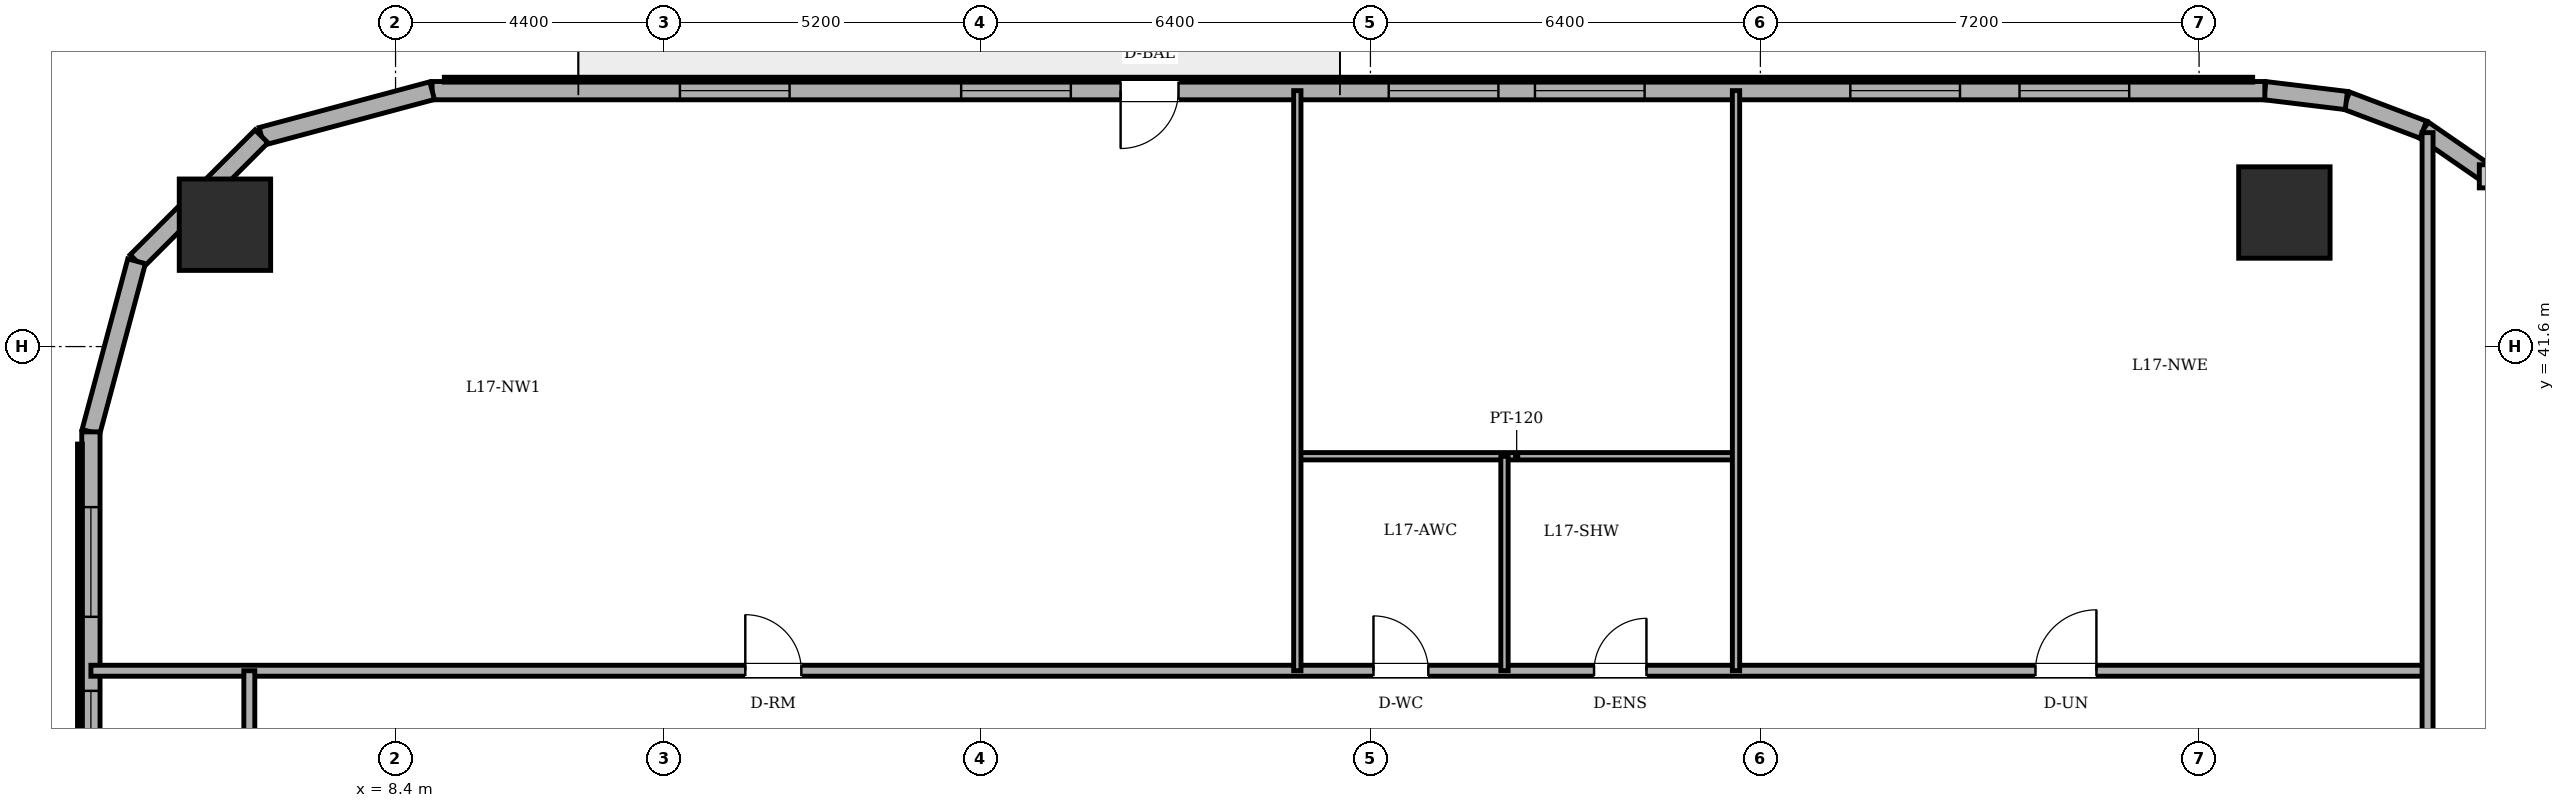
"""IFC4 building model, lengths in metres.
Left out: names, types, materials, properties, quantities, classifications, styles, units other than length and angle.
Written with IfcOpenShell. Run it as: python <this file> out.ifc"""

import sys

from ifc_helpers import new_model, si_unit, direction, frame, frame_2d, origin, origin_2d, place, context, subcontext, project, spatial, rectangle, circle, extrude, element, fill, save


model = new_model("IFC4")
c1 = context("Model", 3, precision=1e-05, world=origin(), true_north=direction((0.0, 1.0)))
c2 = subcontext(c1, "Body", "Model", "MODEL_VIEW")
j1 = project(units=[si_unit("LENGTHUNIT", "METRE"), si_unit("PLANEANGLEUNIT", "RADIAN")], contexts=[c1])
p1 = place(None, origin())
s1 = spatial("IfcSite", under=j1, at=p1, CompositionType="ELEMENT")
p2 = place(p1, origin())
s2 = spatial("IfcBuilding", under=s1, at=p2, CompositionType="ELEMENT")
p3 = place(p2, frame((0.0, 0.0, 64.8)))
s3 = spatial("IfcBuildingStorey", under=s2, at=p3, CompositionType="ELEMENT", Elevation=64.8)
for number, where, z_axis, x_axis in (
    (1, (39.4, 43.8, 0.0), (0.0, 0.0, 1.0), (1.0, 0.0, 0.0)),
    (2, (5.6, 43.6, 0.0), (0.0, 0.0, 1.0), (1.0, 0.0, 0.0)),
):
    element("IfcColumn", number, at=place(p3, frame(where, z_axis=z_axis, x_axis=x_axis)), inside=s3, PredefinedType="COLUMN", context=c2, shape_type="SweptSolid", body=[
        extrude(circle(Radius=0.75, at=origin_2d()), origin(), (0.0, 0.0, 1.0), 3.6),
    ])
p4 = place(p3, frame((42.789, 44.394, 0.0), z_axis=(0.0, 0.0, 1.0), x_axis=(-0.823116500192, 0.567872544777, 0.0)))
e3 = element("IfcWall", 3, at=p4, inside=s3, PredefinedType="SOLIDWALL", context=c2, shape_type="SweptSolid", body=[
    extrude(rectangle(XDim=1.349, YDim=0.3, at=frame_2d((0.674, 0.0))), origin(), (0.0, 0.0, 1.0), 3.4),
])
p5 = place(p3, frame((41.679, 45.16, 0.0), z_axis=(0.0, 0.0, 1.0), x_axis=(-0.935156721165, 0.354234254216, 0.0)))
e4 = element("IfcWall", 4, at=p5, inside=s3, PredefinedType="SOLIDWALL", context=c2, shape_type="SweptSolid", body=[
    extrude(rectangle(XDim=1.349, YDim=0.3, at=frame_2d((0.675, 0.0))), origin(), (0.0, 0.0, 1.0), 3.4),
])
p6 = place(p3, frame((40.417, 45.638, 0.0), z_axis=(0.0, 0.0, 1.0), x_axis=(-0.992739027259, 0.120288086515, 0.0)))
e5 = element("IfcWall", 5, at=p6, inside=s3, PredefinedType="SOLIDWALL", context=c2, shape_type="SweptSolid", body=[
    extrude(rectangle(XDim=1.348, YDim=0.3, at=frame_2d((0.674, 0.0))), origin(), (0.0, 0.0, 1.0), 3.4),
])
p7 = place(p3, frame((39.079, 45.8, 0.0), z_axis=(0.0, 0.0, 1.0), x_axis=(-1.0, 0.0, 0.0)))
e6 = element("IfcWall", 6, at=p7, inside=s3, PredefinedType="SOLIDWALL", context=c2, shape_type="SweptSolid", body=[
    extrude(rectangle(XDim=30.079, YDim=0.3, at=frame_2d((15.04, 0.0))), origin(), (0.0, 0.0, 1.0), 3.4),
])
p8 = place(p7, frame((17.829, 0.0, 0.0)))
e7 = element("IfcOpeningElement", 7, at=p8, cuts=e6, PredefinedType="OPENING", context=c2, shape_type="SweptSolid", body=[
    extrude(rectangle(XDim=0.95, YDim=2.2, at=frame_2d((0.475, 1.1))), frame((0.0, 0.16, 0.0), z_axis=(0.0, -1.0, 0.0), x_axis=(1.0, 0.0, 0.0)), (0.0, 0.0, 1.0), 0.32),
])
p9 = place(p7, frame((2.226, 0.0, 0.85)))
e8 = element("IfcOpeningElement", 8, at=p9, cuts=e6, PredefinedType="OPENING", context=c2, shape_type="SweptSolid", body=[
    extrude(rectangle(XDim=1.8, YDim=1.55, at=frame_2d((0.9, 0.775))), frame((0.0, 0.16, 0.0), z_axis=(0.0, -1.0, 0.0), x_axis=(1.0, 0.0, 0.0)), (0.0, 0.0, 1.0), 0.32),
])
p10 = place(p7, frame((5.003, 0.0, 0.85)))
e9 = element("IfcOpeningElement", 9, at=p10, cuts=e6, PredefinedType="OPENING", context=c2, shape_type="SweptSolid", body=[
    extrude(rectangle(XDim=1.8, YDim=1.55, at=frame_2d((0.9, 0.775))), frame((0.0, 0.16, 0.0), z_axis=(0.0, -1.0, 0.0), x_axis=(1.0, 0.0, 0.0)), (0.0, 0.0, 1.0), 0.32),
])
p11 = place(p7, frame((10.179, 0.0, 0.85)))
e10 = element("IfcOpeningElement", 10, at=p11, cuts=e6, PredefinedType="OPENING", context=c2, shape_type="SweptSolid", body=[
    extrude(rectangle(XDim=1.8, YDim=1.55, at=frame_2d((0.9, 0.775))), frame((0.0, 0.16, 0.0), z_axis=(0.0, -1.0, 0.0), x_axis=(1.0, 0.0, 0.0)), (0.0, 0.0, 1.0), 0.32),
])
p12 = place(p7, frame((12.579, 0.0, 0.85)))
e11 = element("IfcOpeningElement", 11, at=p12, cuts=e6, PredefinedType="OPENING", context=c2, shape_type="SweptSolid", body=[
    extrude(rectangle(XDim=1.8, YDim=1.55, at=frame_2d((0.9, 0.775))), frame((0.0, 0.16, 0.0), z_axis=(0.0, -1.0, 0.0), x_axis=(1.0, 0.0, 0.0)), (0.0, 0.0, 1.0), 0.32),
])
p13 = place(p7, frame((19.596, 0.0, 0.85)))
e12 = element("IfcOpeningElement", 12, at=p13, cuts=e6, PredefinedType="OPENING", context=c2, shape_type="SweptSolid", body=[
    extrude(rectangle(XDim=1.8, YDim=1.55, at=frame_2d((0.9, 0.775))), frame((0.0, 0.16, 0.0), z_axis=(0.0, -1.0, 0.0), x_axis=(1.0, 0.0, 0.0)), (0.0, 0.0, 1.0), 0.32),
])
p14 = place(p7, frame((24.212, 0.0, 0.85)))
e13 = element("IfcOpeningElement", 13, at=p14, cuts=e6, PredefinedType="OPENING", context=c2, shape_type="SweptSolid", body=[
    extrude(rectangle(XDim=1.8, YDim=1.55, at=frame_2d((0.9, 0.775))), frame((0.0, 0.16, 0.0), z_axis=(0.0, -1.0, 0.0), x_axis=(1.0, 0.0, 0.0)), (0.0, 0.0, 1.0), 0.32),
])
p15 = place(p3, frame((9.0, 45.8, 0.0), z_axis=(0.0, 0.0, 1.0), x_axis=(-0.96594917914, -0.258731875344, 0.0)))
e14 = element("IfcWall", 14, at=p15, inside=s3, PredefinedType="SOLIDWALL", context=c2, shape_type="SweptSolid", body=[
    extrude(rectangle(XDim=2.899, YDim=0.3, at=frame_2d((1.449, 0.0))), origin(), (0.0, 0.0, 1.0), 3.4),
])
p16 = place(p3, frame((6.2, 45.05, 0.0), z_axis=(0.0, 0.0, 1.0), x_axis=(-0.707106781187, -0.707106781187, 0.0)))
e15 = element("IfcWall", 15, at=p16, inside=s3, PredefinedType="SOLIDWALL", context=c2, shape_type="SweptSolid", body=[
    extrude(rectangle(XDim=2.899, YDim=0.3, at=frame_2d((1.45, 0.0))), origin(), (0.0, 0.0, 1.0), 3.4),
])
p17 = place(p3, frame((4.15, 43.0, 0.0), z_axis=(0.0, 0.0, 1.0), x_axis=(-0.258731875344, -0.96594917914, 0.0)))
e16 = element("IfcWall", 16, at=p17, inside=s3, PredefinedType="SOLIDWALL", context=c2, shape_type="SweptSolid", body=[
    extrude(rectangle(XDim=2.899, YDim=0.3, at=frame_2d((1.449, 0.0))), origin(), (0.0, 0.0, 1.0), 3.4),
])
p18 = place(p3, frame((3.4, 40.2, 0.0), z_axis=(0.0, 0.0, 1.0), x_axis=(0.0, -1.0, 0.0)))
e17 = element("IfcWall", 17, at=p18, inside=s3, PredefinedType="SOLIDWALL", context=c2, shape_type="SweptSolid", body=[
    extrude(rectangle(XDim=32.4, YDim=0.3, at=frame_2d((16.2, 0.0))), origin(), (0.0, 0.0, 1.0), 3.4),
])
p19 = place(p18, frame((1.235, 0.0, 0.85)))
e18 = element("IfcOpeningElement", 18, at=p19, cuts=e17, PredefinedType="OPENING", context=c2, shape_type="SweptSolid", body=[
    extrude(rectangle(XDim=1.8, YDim=1.55, at=frame_2d((0.9, 0.775))), frame((0.0, 0.16, 0.0), z_axis=(0.0, -1.0, 0.0), x_axis=(1.0, 0.0, 0.0)), (0.0, 0.0, 1.0), 0.32),
])
p20 = place(p18, frame((4.25, 0.0, 0.85)))
e19 = element("IfcOpeningElement", 19, at=p20, cuts=e17, PredefinedType="OPENING", context=c2, shape_type="SweptSolid", body=[
    extrude(rectangle(XDim=1.8, YDim=1.55, at=frame_2d((0.9, 0.775))), frame((0.0, 0.16, 0.0), z_axis=(0.0, -1.0, 0.0), x_axis=(1.0, 0.0, 0.0)), (0.0, 0.0, 1.0), 0.32),
])
p21 = place(p18, frame((12.027, 0.0, 0.85)))
e20 = element("IfcOpeningElement", 20, at=p21, cuts=e17, PredefinedType="OPENING", context=c2, shape_type="SweptSolid", body=[
    extrude(rectangle(XDim=1.8, YDim=1.55, at=frame_2d((0.9, 0.775))), frame((0.0, 0.16, 0.0), z_axis=(0.0, -1.0, 0.0), x_axis=(1.0, 0.0, 0.0)), (0.0, 0.0, 1.0), 0.32),
])
p22 = place(p18, frame((18.573, 0.0, 0.85)))
e21 = element("IfcOpeningElement", 21, at=p22, cuts=e17, PredefinedType="OPENING", context=c2, shape_type="SweptSolid", body=[
    extrude(rectangle(XDim=1.8, YDim=1.55, at=frame_2d((0.9, 0.775))), frame((0.0, 0.16, 0.0), z_axis=(0.0, -1.0, 0.0), x_axis=(1.0, 0.0, 0.0)), (0.0, 0.0, 1.0), 0.32),
])
p23 = place(p18, frame((26.35, 0.0, 0.85)))
e22 = element("IfcOpeningElement", 22, at=p23, cuts=e17, PredefinedType="OPENING", context=c2, shape_type="SweptSolid", body=[
    extrude(rectangle(XDim=1.8, YDim=1.55, at=frame_2d((0.9, 0.775))), frame((0.0, 0.16, 0.0), z_axis=(0.0, -1.0, 0.0), x_axis=(1.0, 0.0, 0.0)), (0.0, 0.0, 1.0), 0.32),
])
p24 = place(p18, frame((29.365, 0.0, 0.85)))
e23 = element("IfcOpeningElement", 23, at=p24, cuts=e17, PredefinedType="OPENING", context=c2, shape_type="SweptSolid", body=[
    extrude(rectangle(XDim=1.8, YDim=1.55, at=frame_2d((0.9, 0.775))), frame((0.0, 0.16, 0.0), z_axis=(0.0, -1.0, 0.0), x_axis=(1.0, 0.0, 0.0)), (0.0, 0.0, 1.0), 0.32),
])
p25 = place(p3, frame((3.4, 36.28, 0.0), z_axis=(0.0, 0.0, 1.0), x_axis=(1.0, 0.0, 0.0)))
e24 = element("IfcWall", 24, at=p25, inside=s3, PredefinedType="PARTITIONING", context=c2, shape_type="SweptSolid", body=[
    extrude(rectangle(XDim=38.35, YDim=0.18, at=frame_2d((19.175, 0.0))), origin(), (0.0, 0.0, 1.0), 3.4),
])
p26 = place(p25, frame((21.05, 0.0, 0.0)))
e25 = element("IfcOpeningElement", 25, at=p26, cuts=e24, PredefinedType="OPENING", context=c2, shape_type="SweptSolid", body=[
    extrude(rectangle(XDim=0.9, YDim=2.1, at=frame_2d((0.45, 1.05))), frame((0.0, 0.1, 0.0), z_axis=(0.0, -1.0, 0.0), x_axis=(1.0, 0.0, 0.0)), (0.0, 0.0, 1.0), 0.2),
])
p27 = place(p25, frame((24.67, 0.0, 0.0)))
e26 = element("IfcOpeningElement", 26, at=p27, cuts=e24, PredefinedType="OPENING", context=c2, shape_type="SweptSolid", body=[
    extrude(rectangle(XDim=0.86, YDim=2.1, at=frame_2d((0.43, 1.05))), frame((0.0, 0.1, 0.0), z_axis=(0.0, -1.0, 0.0), x_axis=(1.0, 0.0, 0.0)), (0.0, 0.0, 1.0), 0.2),
])
p28 = place(p25, frame((10.74, 0.0, 0.0)))
e27 = element("IfcOpeningElement", 27, at=p28, cuts=e24, PredefinedType="OPENING", context=c2, shape_type="SweptSolid", body=[
    extrude(rectangle(XDim=0.92, YDim=2.1, at=frame_2d((0.46, 1.05))), frame((0.0, 0.1, 0.0), z_axis=(0.0, -1.0, 0.0), x_axis=(1.0, 0.0, 0.0)), (0.0, 0.0, 1.0), 0.2),
])
p29 = place(p25, frame((31.915, 0.0, 0.0)))
e28 = element("IfcOpeningElement", 28, at=p29, cuts=e24, PredefinedType="OPENING", context=c2, shape_type="SweptSolid", body=[
    extrude(rectangle(XDim=1.0, YDim=2.15, at=frame_2d((0.5, 1.075))), frame((0.0, 0.1, 0.0), z_axis=(0.0, -1.0, 0.0), x_axis=(1.0, 0.0, 0.0)), (0.0, 0.0, 1.0), 0.2),
])
p30 = place(p3, frame((23.2, 39.8, 0.0), z_axis=(0.0, 0.0, 1.0), x_axis=(1.0, 0.0, 0.0)))
e29 = element("IfcWall", 29, at=p30, inside=s3, PredefinedType="PARTITIONING", context=c2, shape_type="SweptSolid", body=[
    extrude(rectangle(XDim=7.2, YDim=0.12, at=frame_2d((3.6, 0.0))), origin(), (0.0, 0.0, 1.0), 3.4),
])
p31 = place(p3, frame((6.0, 33.82, 0.0), z_axis=(0.0, 0.0, 1.0), x_axis=(0.0, 1.0, 0.0)))
e30 = element("IfcWall", 30, at=p31, inside=s3, PredefinedType="PARTITIONING", context=c2, shape_type="SweptSolid", body=[
    extrude(rectangle(XDim=2.46, YDim=0.18, at=frame_2d((1.23, 0.0))), origin(), (0.0, 0.0, 1.0), 3.4),
])
p32 = place(p3, frame((23.2, 36.28, 0.0), z_axis=(0.0, 0.0, 1.0), x_axis=(0.0, 1.0, 0.0)))
e31 = element("IfcWall", 31, at=p32, inside=s3, PredefinedType="PARTITIONING", context=c2, shape_type="SweptSolid", body=[
    extrude(rectangle(XDim=9.52, YDim=0.12, at=frame_2d((4.76, 0.0))), origin(), (0.0, 0.0, 1.0), 3.4),
])
p33 = place(p3, frame((26.6, 36.28, 0.0), z_axis=(0.0, 0.0, 1.0), x_axis=(0.0, 1.0, 0.0)))
e32 = element("IfcWall", 32, at=p33, inside=s3, PredefinedType="PARTITIONING", context=c2, shape_type="SweptSolid", body=[
    extrude(rectangle(XDim=3.52, YDim=0.12, at=frame_2d((1.76, 0.0))), origin(), (0.0, 0.0, 1.0), 3.4),
])
p34 = place(p3, frame((30.4, 36.28, 0.0), z_axis=(0.0, 0.0, 1.0), x_axis=(0.0, 1.0, 0.0)))
e33 = element("IfcWall", 33, at=p34, inside=s3, PredefinedType="PARTITIONING", context=c2, shape_type="SweptSolid", body=[
    extrude(rectangle(XDim=9.52, YDim=0.12, at=frame_2d((4.76, 0.0))), origin(), (0.0, 0.0, 1.0), 3.4),
])
p35 = place(p3, frame((41.75, 25.18, 0.0), z_axis=(0.0, 0.0, 1.0), x_axis=(0.0, 1.0, 0.0)))
e34 = element("IfcWall", 34, at=p35, inside=s3, PredefinedType="PARTITIONING", context=c2, shape_type="SweptSolid", body=[
    extrude(rectangle(XDim=19.931, YDim=0.18, at=frame_2d((9.966, 0.0))), origin(), (0.0, 0.0, 1.0), 2.782),
])
p36 = place(p35, frame((5.35, 0.0, 0.0)))
e35 = element("IfcOpeningElement", 35, at=p36, cuts=e34, PredefinedType="OPENING", context=c2, shape_type="SweptSolid", body=[
    extrude(rectangle(XDim=0.92, YDim=2.1, at=frame_2d((0.46, 1.05))), frame((0.0, 0.1, 0.0), z_axis=(0.0, -1.0, 0.0), x_axis=(1.0, 0.0, 0.0)), (0.0, 0.0, 1.0), 0.2),
])
p37 = place(p8, origin())
e36 = element("IfcDoor", 36, at=p37, inside=s3, OperationType="SINGLE_SWING_RIGHT", PredefinedType="DOOR", context=c2, shape_type="SweptSolid", body=[
    extrude(rectangle(XDim=0.95, YDim=2.2, at=frame_2d((0.475, 1.1))), frame((0.0, 0.025, 0.0), z_axis=(0.0, -1.0, 0.0), x_axis=(1.0, 0.0, 0.0)), (0.0, 0.0, 1.0), 0.05),
])
fill(e7, e36)
p38 = place(p9, origin())
e37 = element("IfcWindow", 37, at=p38, inside=s3, PartitioningType="DOUBLE_PANEL_VERTICAL", PredefinedType="WINDOW", context=c2, shape_type="SweptSolid", body=[
    extrude(rectangle(XDim=1.8, YDim=1.55, at=frame_2d((0.9, 0.775))), frame((0.0, 0.03, 0.0), z_axis=(0.0, -1.0, 0.0), x_axis=(1.0, 0.0, 0.0)), (0.0, 0.0, 1.0), 0.06),
])
fill(e8, e37)
p39 = place(p10, origin())
e38 = element("IfcWindow", 38, at=p39, inside=s3, PartitioningType="DOUBLE_PANEL_VERTICAL", PredefinedType="WINDOW", context=c2, shape_type="SweptSolid", body=[
    extrude(rectangle(XDim=1.8, YDim=1.55, at=frame_2d((0.9, 0.775))), frame((0.0, 0.03, 0.0), z_axis=(0.0, -1.0, 0.0), x_axis=(1.0, 0.0, 0.0)), (0.0, 0.0, 1.0), 0.06),
])
fill(e9, e38)
p40 = place(p11, origin())
e39 = element("IfcWindow", 39, at=p40, inside=s3, PartitioningType="DOUBLE_PANEL_VERTICAL", PredefinedType="WINDOW", context=c2, shape_type="SweptSolid", body=[
    extrude(rectangle(XDim=1.8, YDim=1.55, at=frame_2d((0.9, 0.775))), frame((0.0, 0.03, 0.0), z_axis=(0.0, -1.0, 0.0), x_axis=(1.0, 0.0, 0.0)), (0.0, 0.0, 1.0), 0.06),
])
fill(e10, e39)
p41 = place(p12, origin())
e40 = element("IfcWindow", 40, at=p41, inside=s3, PartitioningType="DOUBLE_PANEL_VERTICAL", PredefinedType="WINDOW", context=c2, shape_type="SweptSolid", body=[
    extrude(rectangle(XDim=1.8, YDim=1.55, at=frame_2d((0.9, 0.775))), frame((0.0, 0.03, 0.0), z_axis=(0.0, -1.0, 0.0), x_axis=(1.0, 0.0, 0.0)), (0.0, 0.0, 1.0), 0.06),
])
fill(e11, e40)
p42 = place(p13, origin())
e41 = element("IfcWindow", 41, at=p42, inside=s3, PartitioningType="DOUBLE_PANEL_VERTICAL", PredefinedType="WINDOW", context=c2, shape_type="SweptSolid", body=[
    extrude(rectangle(XDim=1.8, YDim=1.55, at=frame_2d((0.9, 0.775))), frame((0.0, 0.03, 0.0), z_axis=(0.0, -1.0, 0.0), x_axis=(1.0, 0.0, 0.0)), (0.0, 0.0, 1.0), 0.06),
])
fill(e12, e41)
p43 = place(p14, origin())
e42 = element("IfcWindow", 42, at=p43, inside=s3, PartitioningType="DOUBLE_PANEL_VERTICAL", PredefinedType="WINDOW", context=c2, shape_type="SweptSolid", body=[
    extrude(rectangle(XDim=1.8, YDim=1.55, at=frame_2d((0.9, 0.775))), frame((0.0, 0.03, 0.0), z_axis=(0.0, -1.0, 0.0), x_axis=(1.0, 0.0, 0.0)), (0.0, 0.0, 1.0), 0.06),
])
fill(e13, e42)
p44 = place(p19, origin())
e43 = element("IfcWindow", 43, at=p44, inside=s3, PartitioningType="DOUBLE_PANEL_VERTICAL", PredefinedType="WINDOW", context=c2, shape_type="SweptSolid", body=[
    extrude(rectangle(XDim=1.8, YDim=1.55, at=frame_2d((0.9, 0.775))), frame((0.0, 0.03, 0.0), z_axis=(0.0, -1.0, 0.0), x_axis=(1.0, 0.0, 0.0)), (0.0, 0.0, 1.0), 0.06),
])
fill(e18, e43)
p45 = place(p20, origin())
e44 = element("IfcWindow", 44, at=p45, inside=s3, PartitioningType="DOUBLE_PANEL_VERTICAL", PredefinedType="WINDOW", context=c2, shape_type="SweptSolid", body=[
    extrude(rectangle(XDim=1.8, YDim=1.55, at=frame_2d((0.9, 0.775))), frame((0.0, 0.03, 0.0), z_axis=(0.0, -1.0, 0.0), x_axis=(1.0, 0.0, 0.0)), (0.0, 0.0, 1.0), 0.06),
])
fill(e19, e44)
p46 = place(p26, origin())
e45 = element("IfcDoor", 45, at=p46, inside=s3, OperationType="SINGLE_SWING_LEFT", PredefinedType="DOOR", context=c2, shape_type="SweptSolid", body=[
    extrude(rectangle(XDim=0.9, YDim=2.1, at=frame_2d((0.45, 1.05))), frame((0.0, 0.025, 0.0), z_axis=(0.0, -1.0, 0.0), x_axis=(1.0, 0.0, 0.0)), (0.0, 0.0, 1.0), 0.05),
])
fill(e25, e45)
p47 = place(p27, origin())
e46 = element("IfcDoor", 46, at=p47, inside=s3, OperationType="SINGLE_SWING_RIGHT", PredefinedType="DOOR", context=c2, shape_type="SweptSolid", body=[
    extrude(rectangle(XDim=0.86, YDim=2.1, at=frame_2d((0.43, 1.05))), frame((0.0, 0.025, 0.0), z_axis=(0.0, -1.0, 0.0), x_axis=(1.0, 0.0, 0.0)), (0.0, 0.0, 1.0), 0.05),
])
fill(e26, e46)
p48 = place(p28, origin())
e47 = element("IfcDoor", 47, at=p48, inside=s3, OperationType="SINGLE_SWING_LEFT", PredefinedType="DOOR", context=c2, shape_type="SweptSolid", body=[
    extrude(rectangle(XDim=0.92, YDim=2.1, at=frame_2d((0.46, 1.05))), frame((0.0, 0.025, 0.0), z_axis=(0.0, -1.0, 0.0), x_axis=(1.0, 0.0, 0.0)), (0.0, 0.0, 1.0), 0.05),
])
fill(e27, e47)
p49 = place(p29, origin())
e48 = element("IfcDoor", 48, at=p49, inside=s3, OperationType="SINGLE_SWING_RIGHT", PredefinedType="DOOR", context=c2, shape_type="SweptSolid", body=[
    extrude(rectangle(XDim=1.0, YDim=2.15, at=frame_2d((0.5, 1.075))), frame((0.0, 0.025, 0.0), z_axis=(0.0, -1.0, 0.0), x_axis=(1.0, 0.0, 0.0)), (0.0, 0.0, 1.0), 0.05),
])
fill(e28, e48)
save(model, sys.argv[1])
